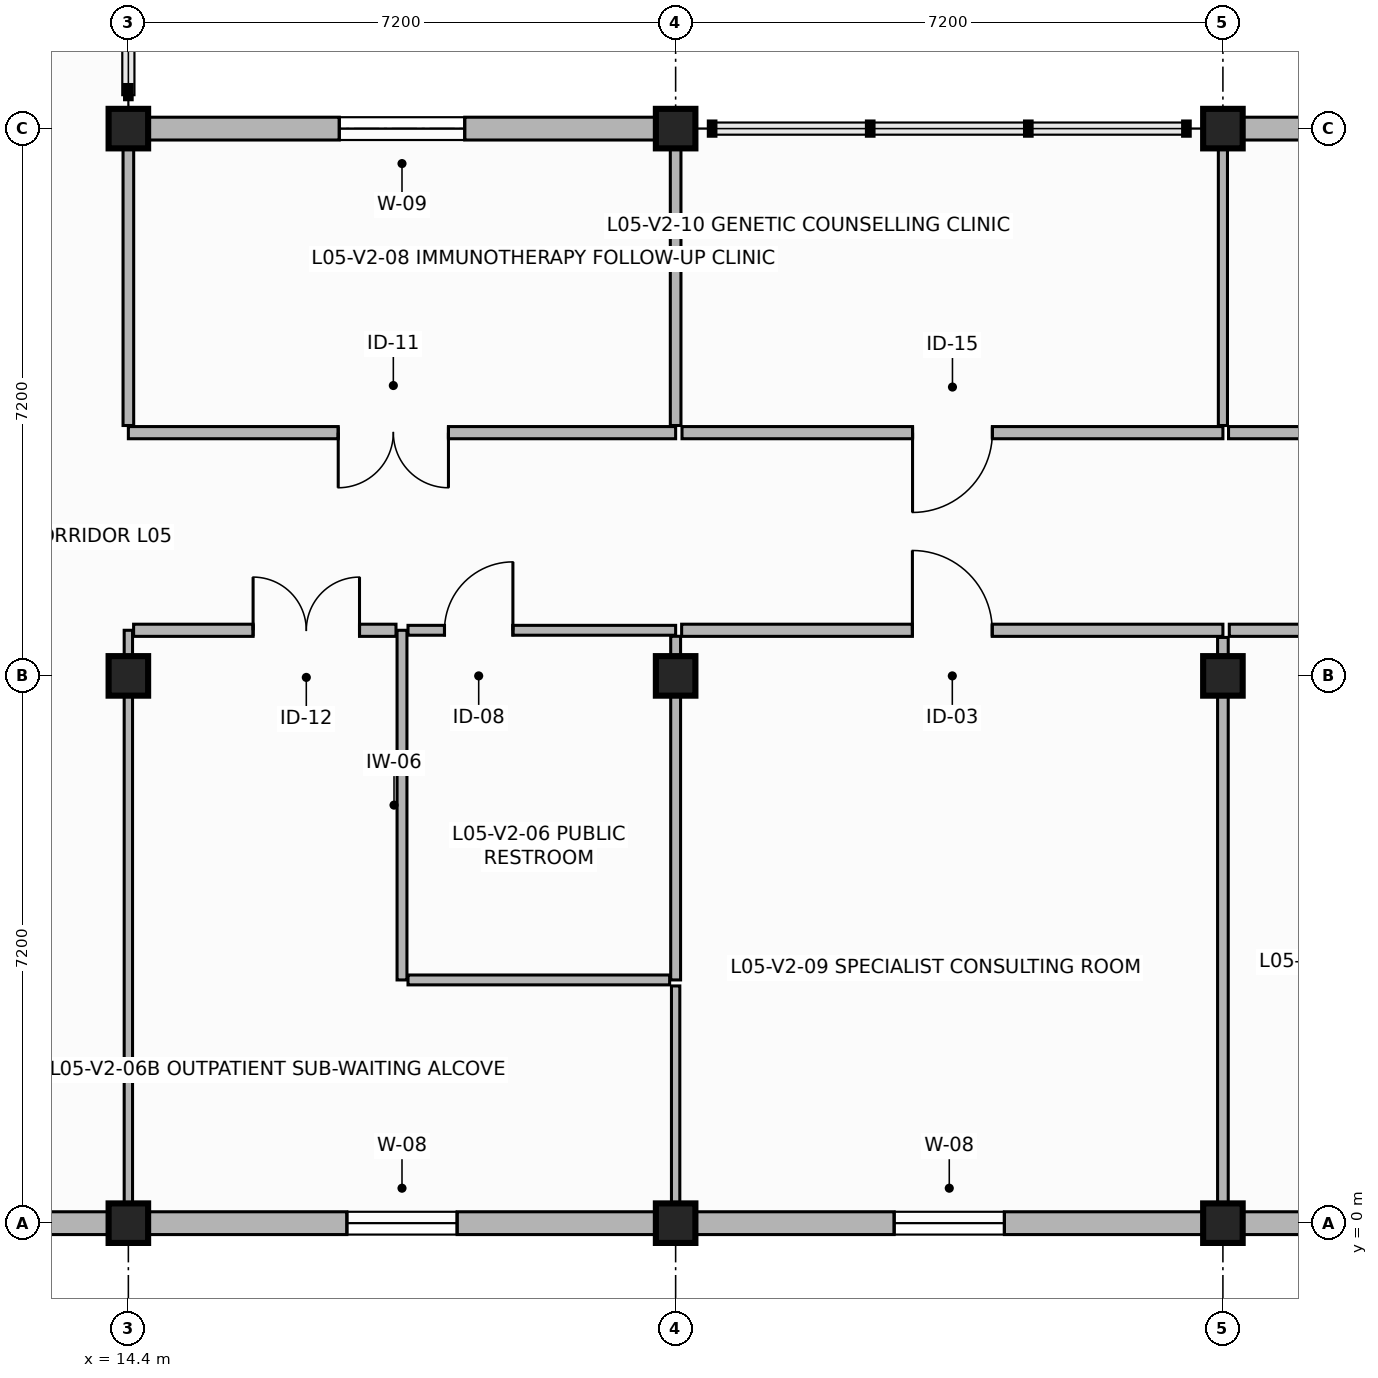
"""IFC4 building model, lengths in metres.
Left out: names, types, materials, properties, quantities, classifications, styles, units other than length and angle.
Written with IfcOpenShell. Run it as: python <this file> out.ifc"""

import sys

from ifc_helpers import new_model, si_unit, direction, frame, frame_2d, origin, origin_2d, place, context, subcontext, project, spatial, rectangle, extrude, element, fill, save


model = new_model("IFC4")
c1 = context("Model", 3, precision=1e-05, world=origin(), true_north=direction((0.0, 1.0)))
c2 = subcontext(c1, "Body", "Model", "MODEL_VIEW")
j1 = project(units=[si_unit("LENGTHUNIT", "METRE"), si_unit("PLANEANGLEUNIT", "RADIAN")], contexts=[c1])
p1 = place(None, origin())
s1 = spatial("IfcSite", under=j1, at=p1, CompositionType="ELEMENT")
p2 = place(p1, origin())
s2 = spatial("IfcBuilding", under=s1, at=p2, CompositionType="ELEMENT")
p3 = place(p2, frame((0.0, 0.0, 19.7)))
s3 = spatial("IfcBuildingStorey", under=s2, at=p3, CompositionType="ELEMENT", Elevation=19.7)
for number, where, z_axis, x_axis in (
    (1, (14.4, 0.0, 0.0), (0.0, 0.0, 1.0), (1.0, 0.0, 0.0)),
    (2, (14.4, 7.2, 0.0), (0.0, 0.0, 1.0), (1.0, 0.0, 0.0)),
    (3, (14.4, 14.4, 0.0), (0.0, 0.0, 1.0), (1.0, 0.0, 0.0)),
    (4, (21.6, 0.0, 0.0), (0.0, 0.0, 1.0), (1.0, 0.0, 0.0)),
    (5, (21.6, 7.2, 0.0), (0.0, 0.0, 1.0), (1.0, 0.0, 0.0)),
    (6, (21.6, 14.4, 0.0), (0.0, 0.0, 1.0), (1.0, 0.0, 0.0)),
    (7, (28.8, 0.0, 0.0), (0.0, 0.0, 1.0), (1.0, 0.0, 0.0)),
    (8, (28.8, 7.2, 0.0), (0.0, 0.0, 1.0), (1.0, 0.0, 0.0)),
    (9, (28.8, 14.4, 0.0), (0.0, 0.0, 1.0), (1.0, 0.0, 0.0)),
):
    element("IfcColumn", number, at=place(p3, frame(where, z_axis=z_axis, x_axis=x_axis)), inside=s3, PredefinedType="COLUMN", context=c2, shape_type="SweptSolid", body=[
        extrude(rectangle(XDim=0.52, YDim=0.52, at=origin_2d()), origin(), (0.0, 0.0, 1.0), 3.42),
    ])
p4 = place(p3, frame((7.2, 0.0, 0.0), z_axis=(0.0, 0.0, 1.0), x_axis=(1.0, 0.0, 0.0)))
e10 = element("IfcWall", 10, at=p4, inside=s3, PredefinedType="SOLIDWALL", context=c2, shape_type="SweptSolid", body=[
    extrude(rectangle(XDim=7.2, YDim=0.3, at=frame_2d((3.6, 0.0))), origin(), (0.0, 0.0, 1.0), 2.8),
])
p5 = place(p4, frame((2.875, 0.0, 0.85)))
e11 = element("IfcOpeningElement", 11, at=p5, cuts=e10, PredefinedType="OPENING", context=c2, shape_type="SweptSolid", body=[
    extrude(rectangle(XDim=1.45, YDim=1.75, at=frame_2d((0.725, 0.875))), frame((0.0, 0.16, 0.0), z_axis=(0.0, -1.0, 0.0), x_axis=(1.0, 0.0, 0.0)), (0.0, 0.0, 1.0), 0.32),
])
p6 = place(p3, frame((14.4, 0.0, 0.0), z_axis=(0.0, 0.0, 1.0), x_axis=(1.0, 0.0, 0.0)))
e12 = element("IfcWall", 12, at=p6, inside=s3, PredefinedType="SOLIDWALL", context=c2, shape_type="SweptSolid", body=[
    extrude(rectangle(XDim=7.2, YDim=0.3, at=frame_2d((3.6, 0.0))), origin(), (0.0, 0.0, 1.0), 2.8),
])
p7 = place(p6, frame((2.875, 0.0, 0.85)))
e13 = element("IfcOpeningElement", 13, at=p7, cuts=e12, PredefinedType="OPENING", context=c2, shape_type="SweptSolid", body=[
    extrude(rectangle(XDim=1.45, YDim=1.75, at=frame_2d((0.725, 0.875))), frame((0.0, 0.16, 0.0), z_axis=(0.0, -1.0, 0.0), x_axis=(1.0, 0.0, 0.0)), (0.0, 0.0, 1.0), 0.32),
])
p8 = place(p3, frame((21.6, 0.0, 0.0), z_axis=(0.0, 0.0, 1.0), x_axis=(1.0, 0.0, 0.0)))
e14 = element("IfcWall", 14, at=p8, inside=s3, PredefinedType="SOLIDWALL", context=c2, shape_type="SweptSolid", body=[
    extrude(rectangle(XDim=7.2, YDim=0.3, at=frame_2d((3.6, 0.0))), origin(), (0.0, 0.0, 1.0), 2.8),
])
p9 = place(p8, frame((2.875, 0.0, 0.85)))
e15 = element("IfcOpeningElement", 15, at=p9, cuts=e14, PredefinedType="OPENING", context=c2, shape_type="SweptSolid", body=[
    extrude(rectangle(XDim=1.45, YDim=1.75, at=frame_2d((0.725, 0.875))), frame((0.0, 0.16, 0.0), z_axis=(0.0, -1.0, 0.0), x_axis=(1.0, 0.0, 0.0)), (0.0, 0.0, 1.0), 0.32),
])
p10 = place(p3, frame((28.8, 0.0, 0.0), z_axis=(0.0, 0.0, 1.0), x_axis=(1.0, 0.0, 0.0)))
e16 = element("IfcWall", 16, at=p10, inside=s3, PredefinedType="SOLIDWALL", context=c2, shape_type="SweptSolid", body=[
    extrude(rectangle(XDim=4.8, YDim=0.3, at=frame_2d((2.4, 0.0))), origin(), (0.0, 0.0, 1.0), 2.8),
])
p11 = place(p10, frame((1.875, 0.0, 0.85)))
e17 = element("IfcOpeningElement", 17, at=p11, cuts=e16, PredefinedType="OPENING", context=c2, shape_type="SweptSolid", body=[
    extrude(rectangle(XDim=1.05, YDim=1.7, at=frame_2d((0.525, 0.85))), frame((0.0, 0.16, 0.0), z_axis=(0.0, -1.0, 0.0), x_axis=(1.0, 0.0, 0.0)), (0.0, 0.0, 1.0), 0.32),
])
p12 = place(p3, frame((33.6, 14.4, 0.0), z_axis=(0.0, 0.0, 1.0), x_axis=(-1.0, 0.0, 0.0)))
e18 = element("IfcWall", 18, at=p12, inside=s3, PredefinedType="SOLIDWALL", context=c2, shape_type="SweptSolid", body=[
    extrude(rectangle(XDim=4.8, YDim=0.3, at=frame_2d((2.4, 0.0))), origin(), (0.0, 0.0, 1.0), 2.8),
])
p13 = place(p12, frame((1.875, 0.0, 0.85)))
e19 = element("IfcOpeningElement", 19, at=p13, cuts=e18, PredefinedType="OPENING", context=c2, shape_type="SweptSolid", body=[
    extrude(rectangle(XDim=1.05, YDim=1.7, at=frame_2d((0.525, 0.85))), frame((0.0, 0.16, 0.0), z_axis=(0.0, -1.0, 0.0), x_axis=(1.0, 0.0, 0.0)), (0.0, 0.0, 1.0), 0.32),
])
p14 = place(p3, frame((21.6, 14.4, 0.0), z_axis=(0.0, 0.0, 1.0), x_axis=(-1.0, 0.0, 0.0)))
e20 = element("IfcWall", 20, at=p14, inside=s3, PredefinedType="SOLIDWALL", context=c2, shape_type="SweptSolid", body=[
    extrude(rectangle(XDim=7.2, YDim=0.3, at=frame_2d((3.6, 0.0))), origin(), (0.0, 0.0, 1.0), 2.8),
])
p15 = place(p14, frame((2.775, 0.0, 0.85)))
e21 = element("IfcOpeningElement", 21, at=p15, cuts=e20, PredefinedType="OPENING", context=c2, shape_type="SweptSolid", body=[
    extrude(rectangle(XDim=1.65, YDim=1.75, at=frame_2d((0.825, 0.875))), frame((0.0, 0.16, 0.0), z_axis=(0.0, -1.0, 0.0), x_axis=(1.0, 0.0, 0.0)), (0.0, 0.0, 1.0), 0.32),
])
p16 = place(p3, frame((18.0, 3.2, 0.0), z_axis=(0.0, 0.0, 1.0), x_axis=(0.0, 1.0, 0.0)))
e22 = element("IfcWall", 22, at=p16, inside=s3, PredefinedType="PARTITIONING", context=c2, shape_type="SweptSolid", body=[
    extrude(rectangle(XDim=4.6, YDim=0.13, at=frame_2d((2.3, 0.0))), origin(), (0.0, 0.0, 1.0), 2.78),
])
p17 = place(p3, frame((18.079, 7.8, 0.0), z_axis=(0.0, 0.0, 1.0), x_axis=(1.0, 0.0, 0.0)))
e23 = element("IfcWall", 23, at=p17, inside=s3, PredefinedType="PARTITIONING", context=c2, shape_type="SweptSolid", body=[
    extrude(rectangle(XDim=3.521, YDim=0.13, at=frame_2d((1.76, 0.0))), origin(), (0.0, 0.0, 1.0), 2.78),
])
p18 = place(p17, frame((0.48, 0.0, 0.0)))
e24 = element("IfcOpeningElement", 24, at=p18, cuts=e23, PredefinedType="OPENING", context=c2, shape_type="SweptSolid", body=[
    extrude(rectangle(XDim=0.9, YDim=2.1, at=frame_2d((0.45, 1.05))), frame((0.0, 0.075, 0.0), z_axis=(0.0, -1.0, 0.0), x_axis=(1.0, 0.0, 0.0)), (0.0, 0.0, 1.0), 0.15),
])
p19 = place(p3, frame((21.6, 7.721, 0.0), z_axis=(0.0, 0.0, 1.0), x_axis=(0.0, -1.0, 0.0)))
e25 = element("IfcWall", 25, at=p19, inside=s3, PredefinedType="PARTITIONING", context=c2, shape_type="SweptSolid", body=[
    extrude(rectangle(XDim=4.521, YDim=0.13, at=frame_2d((2.26, 0.0))), origin(), (0.0, 0.0, 1.0), 2.78),
])
p20 = place(p3, frame((21.521, 3.2, 0.0), z_axis=(0.0, 0.0, 1.0), x_axis=(-1.0, 0.0, 0.0)))
e26 = element("IfcWall", 26, at=p20, inside=s3, PredefinedType="PARTITIONING", context=c2, shape_type="SweptSolid", body=[
    extrude(rectangle(XDim=3.442, YDim=0.13, at=frame_2d((1.721, 0.0))), origin(), (0.0, 0.0, 1.0), 2.78),
])
p21 = place(p3, frame((14.4, 0.165, 0.0), z_axis=(0.0, 0.0, 1.0), x_axis=(0.0, 1.0, 0.0)))
e27 = element("IfcWall", 27, at=p21, inside=s3, PredefinedType="PARTITIONING", context=c2, shape_type="SweptSolid", body=[
    extrude(rectangle(XDim=7.635, YDim=0.11, at=frame_2d((3.817, 0.0))), origin(), (0.0, 0.0, 1.0), 2.78),
])
p22 = place(p3, frame((14.469, 7.8, 0.0), z_axis=(0.0, 0.0, 1.0), x_axis=(1.0, 0.0, 0.0)))
e28 = element("IfcWall", 28, at=p22, inside=s3, PredefinedType="PARTITIONING", context=c2, shape_type="SweptSolid", body=[
    extrude(rectangle(XDim=3.452, YDim=0.16, at=frame_2d((1.726, 0.0))), origin(), (0.0, 0.0, 1.0), 2.78),
])
p23 = place(p22, frame((1.572, 0.0, 0.0)))
e29 = element("IfcOpeningElement", 29, at=p23, cuts=e28, PredefinedType="OPENING", context=c2, shape_type="SweptSolid", body=[
    extrude(rectangle(XDim=1.4, YDim=2.3, at=frame_2d((0.7, 1.15))), frame((0.0, 0.09, 0.0), z_axis=(0.0, -1.0, 0.0), x_axis=(1.0, 0.0, 0.0)), (0.0, 0.0, 1.0), 0.18),
])
p24 = place(p3, frame((21.6, 3.121, 0.0), z_axis=(0.0, 0.0, 1.0), x_axis=(0.0, -1.0, 0.0)))
e30 = element("IfcWall", 30, at=p24, inside=s3, PredefinedType="PARTITIONING", context=c2, shape_type="SweptSolid", body=[
    extrude(rectangle(XDim=2.956, YDim=0.11, at=frame_2d((1.478, 0.0))), origin(), (0.0, 0.0, 1.0), 2.78),
])
p25 = place(p3, frame((21.6, 10.4, 0.0), z_axis=(0.0, 0.0, 1.0), x_axis=(-1.0, 0.0, 0.0)))
e31 = element("IfcWall", 31, at=p25, inside=s3, PredefinedType="PARTITIONING", context=c2, shape_type="SweptSolid", body=[
    extrude(rectangle(XDim=7.2, YDim=0.16, at=frame_2d((3.6, 0.0))), origin(), (0.0, 0.0, 1.0), 2.78),
])
p26 = place(p25, frame((2.989, 0.0, 0.0)))
e32 = element("IfcOpeningElement", 32, at=p26, cuts=e31, PredefinedType="OPENING", context=c2, shape_type="SweptSolid", body=[
    extrude(rectangle(XDim=1.45, YDim=2.25, at=frame_2d((0.725, 1.125))), frame((0.0, 0.09, 0.0), z_axis=(0.0, -1.0, 0.0), x_axis=(1.0, 0.0, 0.0)), (0.0, 0.0, 1.0), 0.18),
])
for number, where, z_axis, x_axis in (
    (33, (14.4, 10.494, 0.0), (0.0, 0.0, 1.0), (0.0, 1.0, 0.0)),
    (34, (21.6, 14.235, 0.0), (0.0, 0.0, 1.0), (0.0, -1.0, 0.0)),
):
    element("IfcWall", number, at=place(p3, frame(where, z_axis=z_axis, x_axis=x_axis)), inside=s3, PredefinedType="PARTITIONING", context=c2, shape_type="SweptSolid", body=[
        extrude(rectangle(XDim=3.741, YDim=0.14, at=frame_2d((1.871, 0.0))), origin(), (0.0, 0.0, 1.0), 2.78),
    ])
p27 = place(p3, frame((21.679, 7.8, 0.0), z_axis=(0.0, 0.0, 1.0), x_axis=(1.0, 0.0, 0.0)))
e35 = element("IfcWall", 35, at=p27, inside=s3, PredefinedType="PARTITIONING", context=c2, shape_type="SweptSolid", body=[
    extrude(rectangle(XDim=7.121, YDim=0.16, at=frame_2d((3.561, 0.0))), origin(), (0.0, 0.0, 1.0), 2.78),
])
p28 = place(p27, frame((3.036, 0.0, 0.0)))
e36 = element("IfcOpeningElement", 36, at=p28, cuts=e35, PredefinedType="OPENING", context=c2, shape_type="SweptSolid", body=[
    extrude(rectangle(XDim=1.05, YDim=2.15, at=frame_2d((0.525, 1.075))), frame((0.0, 0.09, 0.0), z_axis=(0.0, -1.0, 0.0), x_axis=(1.0, 0.0, 0.0)), (0.0, 0.0, 1.0), 0.18),
])
p29 = place(p3, frame((28.8, 7.706, 0.0), z_axis=(0.0, 0.0, 1.0), x_axis=(0.0, -1.0, 0.0)))
e37 = element("IfcWall", 37, at=p29, inside=s3, PredefinedType="PARTITIONING", context=c2, shape_type="SweptSolid", body=[
    extrude(rectangle(XDim=7.541, YDim=0.14, at=frame_2d((3.771, 0.0))), origin(), (0.0, 0.0, 1.0), 2.78),
])
p30 = place(p3, frame((28.8, 10.4, 0.0), z_axis=(0.0, 0.0, 1.0), x_axis=(-1.0, 0.0, 0.0)))
e38 = element("IfcWall", 38, at=p30, inside=s3, PredefinedType="PARTITIONING", context=c2, shape_type="SweptSolid", body=[
    extrude(rectangle(XDim=7.116, YDim=0.16, at=frame_2d((3.558, 0.0))), origin(), (0.0, 0.0, 1.0), 2.78),
])
p31 = place(p30, frame((3.033, 0.0, 0.0)))
e39 = element("IfcOpeningElement", 39, at=p31, cuts=e38, PredefinedType="OPENING", context=c2, shape_type="SweptSolid", body=[
    extrude(rectangle(XDim=1.05, YDim=2.2, at=frame_2d((0.525, 1.1))), frame((0.0, 0.09, 0.0), z_axis=(0.0, -1.0, 0.0), x_axis=(1.0, 0.0, 0.0)), (0.0, 0.0, 1.0), 0.18),
])
p32 = place(p3, frame((28.8, 14.235, 0.0), z_axis=(0.0, 0.0, 1.0), x_axis=(0.0, -1.0, 0.0)))
e40 = element("IfcWall", 40, at=p32, inside=s3, PredefinedType="PARTITIONING", context=c2, shape_type="SweptSolid", body=[
    extrude(rectangle(XDim=3.741, YDim=0.12, at=frame_2d((1.871, 0.0))), origin(), (0.0, 0.0, 1.0), 2.78),
])
p33 = place(p3, frame((28.884, 7.8, 0.0), z_axis=(0.0, 0.0, 1.0), x_axis=(1.0, 0.0, 0.0)))
e41 = element("IfcWall", 41, at=p33, inside=s3, PredefinedType="PARTITIONING", context=c2, shape_type="SweptSolid", body=[
    extrude(rectangle(XDim=4.551, YDim=0.16, at=frame_2d((2.275, 0.0))), origin(), (0.0, 0.0, 1.0), 2.78),
])
p34 = place(p33, frame((1.601, 0.0, 0.0)))
e42 = element("IfcOpeningElement", 42, at=p34, cuts=e41, PredefinedType="OPENING", context=c2, shape_type="SweptSolid", body=[
    extrude(rectangle(XDim=1.35, YDim=2.25, at=frame_2d((0.675, 1.125))), frame((0.0, 0.09, 0.0), z_axis=(0.0, -1.0, 0.0), x_axis=(1.0, 0.0, 0.0)), (0.0, 0.0, 1.0), 0.18),
])
p35 = place(p3, frame((33.435, 10.4, 0.0), z_axis=(0.0, 0.0, 1.0), x_axis=(-1.0, 0.0, 0.0)))
e43 = element("IfcWall", 43, at=p35, inside=s3, PredefinedType="PARTITIONING", context=c2, shape_type="SweptSolid", body=[
    extrude(rectangle(XDim=4.561, YDim=0.16, at=frame_2d((2.281, 0.0))), origin(), (0.0, 0.0, 1.0), 2.78),
])
p36 = place(p35, frame((1.756, 0.0, 0.0)))
e44 = element("IfcOpeningElement", 44, at=p36, cuts=e43, PredefinedType="OPENING", context=c2, shape_type="SweptSolid", body=[
    extrude(rectangle(XDim=1.05, YDim=2.2, at=frame_2d((0.525, 1.1))), frame((0.0, 0.09, 0.0), z_axis=(0.0, -1.0, 0.0), x_axis=(1.0, 0.0, 0.0)), (0.0, 0.0, 1.0), 0.18),
])
p37 = place(p7, origin())
e45 = element("IfcWindow", 45, at=p37, inside=s3, PartitioningType="SINGLE_PANEL", PredefinedType="WINDOW", context=c2, shape_type="SweptSolid", body=[
    extrude(rectangle(XDim=1.45, YDim=1.75, at=frame_2d((0.725, 0.875))), frame((0.0, 0.03, 0.0), z_axis=(0.0, -1.0, 0.0), x_axis=(1.0, 0.0, 0.0)), (0.0, 0.0, 1.0), 0.06),
])
fill(e13, e45)
p38 = place(p9, origin())
e46 = element("IfcWindow", 46, at=p38, inside=s3, PartitioningType="SINGLE_PANEL", PredefinedType="WINDOW", context=c2, shape_type="SweptSolid", body=[
    extrude(rectangle(XDim=1.45, YDim=1.75, at=frame_2d((0.725, 0.875))), frame((0.0, 0.03, 0.0), z_axis=(0.0, -1.0, 0.0), x_axis=(1.0, 0.0, 0.0)), (0.0, 0.0, 1.0), 0.06),
])
fill(e15, e46)
p39 = place(p15, origin())
e47 = element("IfcWindow", 47, at=p39, inside=s3, PartitioningType="SINGLE_PANEL", PredefinedType="WINDOW", context=c2, shape_type="SweptSolid", body=[
    extrude(rectangle(XDim=1.65, YDim=1.75, at=frame_2d((0.825, 0.875))), frame((0.0, 0.03, 0.0), z_axis=(0.0, -1.0, 0.0), x_axis=(1.0, 0.0, 0.0)), (0.0, 0.0, 1.0), 0.06),
])
fill(e21, e47)
p40 = place(p18, origin())
e48 = element("IfcDoor", 48, at=p40, inside=s3, OperationType="SINGLE_SWING_RIGHT", PredefinedType="DOOR", context=c2, shape_type="SweptSolid", body=[
    extrude(rectangle(XDim=0.9, YDim=2.1, at=frame_2d((0.45, 1.05))), frame((0.0, 0.025, 0.0), z_axis=(0.0, -1.0, 0.0), x_axis=(1.0, 0.0, 0.0)), (0.0, 0.0, 1.0), 0.05),
])
fill(e24, e48)
p41 = place(p23, origin())
e49 = element("IfcDoor", 49, at=p41, inside=s3, OperationType="DOUBLE_DOOR_SINGLE_SWING", PredefinedType="DOOR", context=c2, shape_type="SweptSolid", body=[
    extrude(rectangle(XDim=1.4, YDim=2.3, at=frame_2d((0.7, 1.15))), frame((0.0, 0.025, 0.0), z_axis=(0.0, -1.0, 0.0), x_axis=(1.0, 0.0, 0.0)), (0.0, 0.0, 1.0), 0.05),
])
fill(e29, e49)
p42 = place(p26, origin())
e50 = element("IfcDoor", 50, at=p42, inside=s3, OperationType="DOUBLE_DOOR_SINGLE_SWING", PredefinedType="DOOR", context=c2, shape_type="SweptSolid", body=[
    extrude(rectangle(XDim=1.45, YDim=2.25, at=frame_2d((0.725, 1.125))), frame((0.0, 0.025, 0.0), z_axis=(0.0, -1.0, 0.0), x_axis=(1.0, 0.0, 0.0)), (0.0, 0.0, 1.0), 0.05),
])
fill(e32, e50)
p43 = place(p28, origin())
e51 = element("IfcDoor", 51, at=p43, inside=s3, OperationType="SINGLE_SWING_LEFT", PredefinedType="DOOR", context=c2, shape_type="SweptSolid", body=[
    extrude(rectangle(XDim=1.05, YDim=2.15, at=frame_2d((0.525, 1.075))), frame((0.0, 0.025, 0.0), z_axis=(0.0, -1.0, 0.0), x_axis=(1.0, 0.0, 0.0)), (0.0, 0.0, 1.0), 0.05),
])
fill(e36, e51)
p44 = place(p31, origin())
e52 = element("IfcDoor", 52, at=p44, inside=s3, OperationType="SINGLE_SWING_RIGHT", PredefinedType="DOOR", context=c2, shape_type="SweptSolid", body=[
    extrude(rectangle(XDim=1.05, YDim=2.2, at=frame_2d((0.525, 1.1))), frame((0.0, 0.025, 0.0), z_axis=(0.0, -1.0, 0.0), x_axis=(1.0, 0.0, 0.0)), (0.0, 0.0, 1.0), 0.05),
])
fill(e39, e52)
save(model, sys.argv[1])
